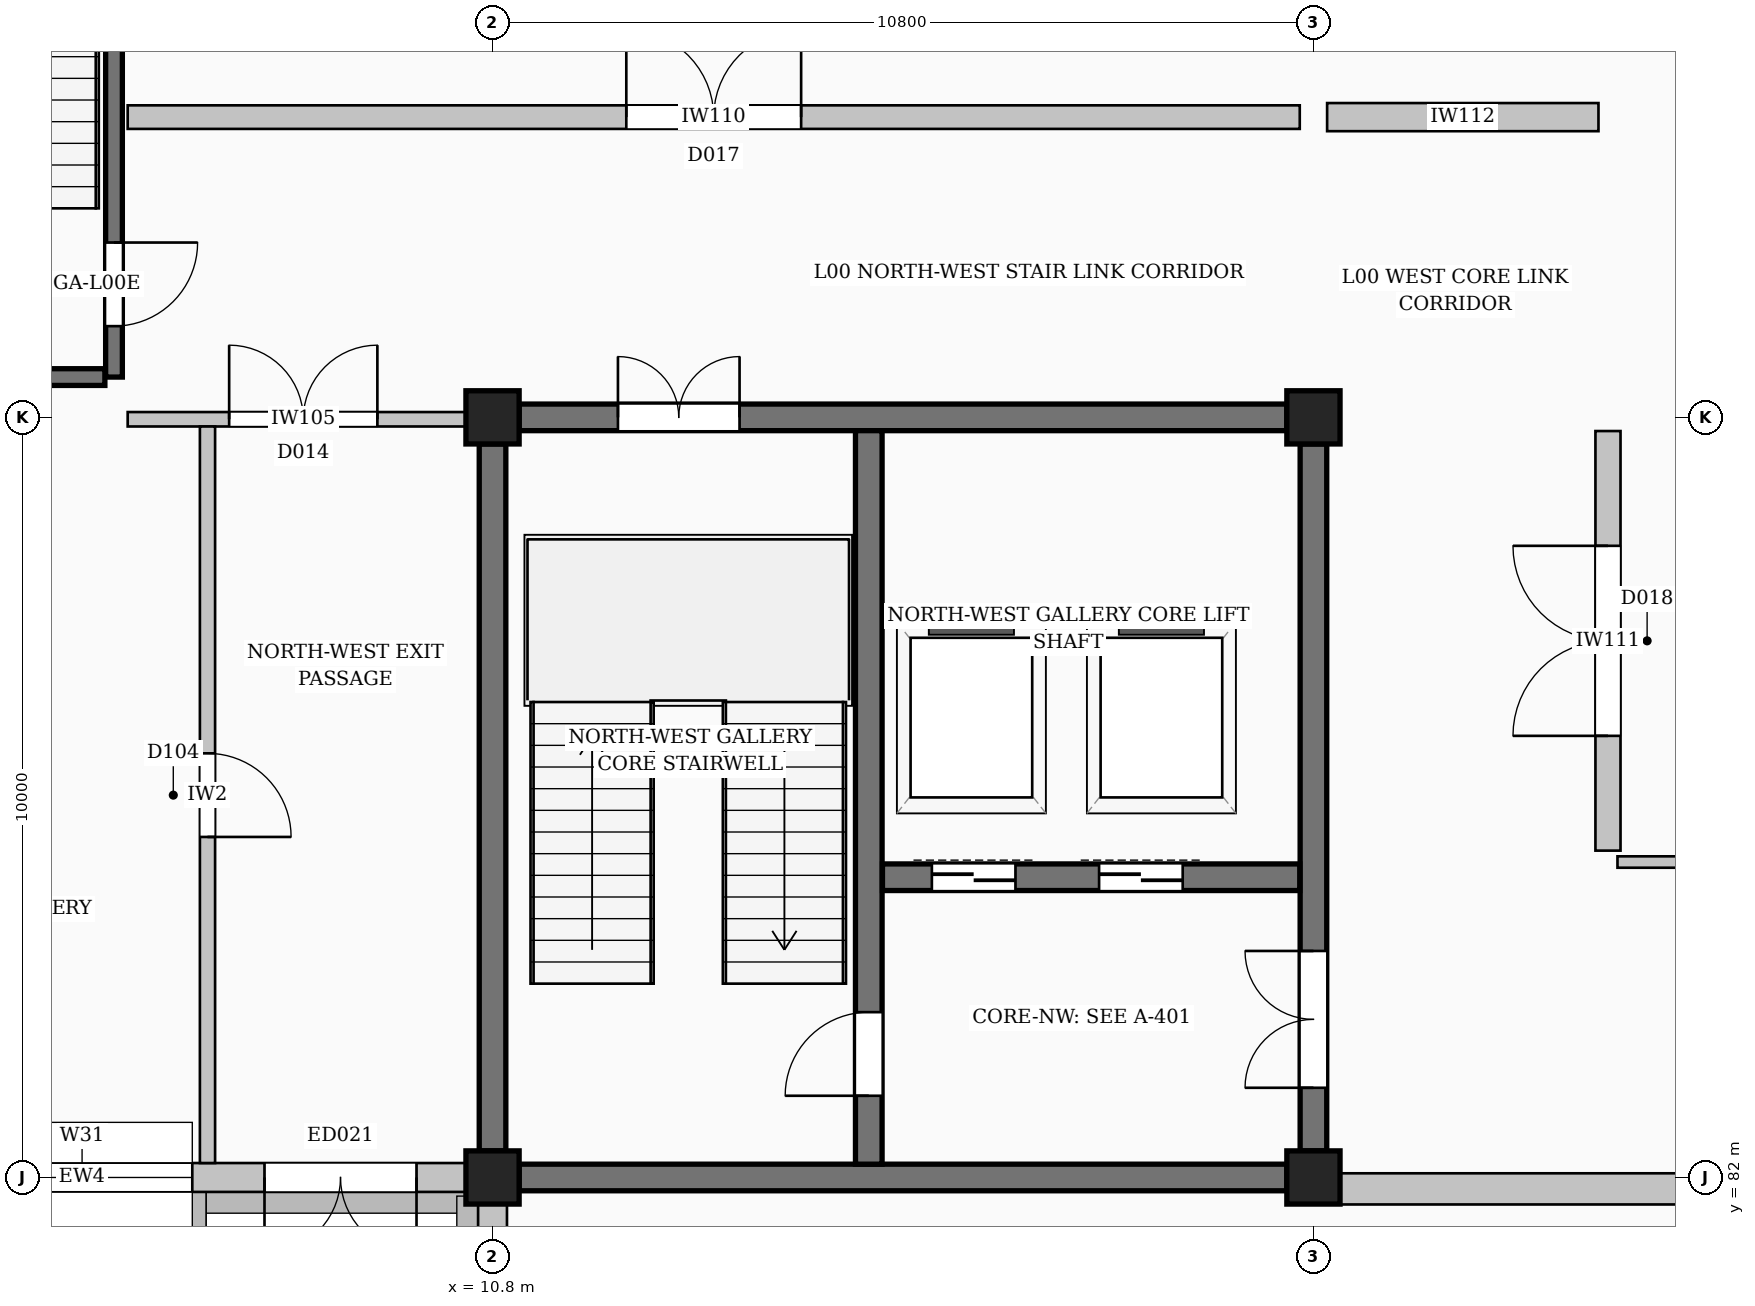
"""IFC4 building model, lengths in metres.
Left out: names, types, materials, properties, quantities, classifications, styles, units other than length and angle.
Written with IfcOpenShell. Run it as: python <this file> out.ifc"""

import sys

from ifc_helpers import new_model, si_unit, direction, frame, frame_2d, origin, origin_2d, place, context, subcontext, project, spatial, rectangle, extrude, element, fill, save


model = new_model("IFC4")
c1 = context("Model", 3, precision=1e-05, world=origin(), true_north=direction((0.0, 1.0)))
c2 = subcontext(c1, "Body", "Model", "MODEL_VIEW")
j1 = project(units=[si_unit("LENGTHUNIT", "METRE"), si_unit("PLANEANGLEUNIT", "RADIAN")], contexts=[c1])
p1 = place(None, origin())
s1 = spatial("IfcSite", under=j1, at=p1, CompositionType="ELEMENT")
p2 = place(p1, origin())
s2 = spatial("IfcBuilding", under=s1, at=p2, CompositionType="ELEMENT")
p3 = place(p2, origin())
s3 = spatial("IfcBuildingStorey", under=s2, at=p3, CompositionType="ELEMENT", Elevation=0.0)
for number, where, z_axis, x_axis in (
    (1, (10.8, 82.0, 0.0), (0.0, 0.0, 1.0), (1.0, 0.0, 0.0)),
    (2, (10.8, 92.0, 0.0), (0.0, 0.0, 1.0), (1.0, 0.0, 0.0)),
    (3, (21.6, 82.0, 0.0), (0.0, 0.0, 1.0), (1.0, 0.0, 0.0)),
    (4, (21.6, 92.0, 0.0), (0.0, 0.0, 1.0), (1.0, 0.0, 0.0)),
):
    element("IfcColumn", number, at=place(p3, frame(where, z_axis=z_axis, x_axis=x_axis)), inside=s3, PredefinedType="COLUMN", context=c2, shape_type="SweptSolid", body=[
        extrude(rectangle(XDim=0.7, YDim=0.7, at=origin_2d()), origin(), (0.0, 0.0, 1.0), 4.8),
    ])
p4 = place(p3, frame((0.145, 82.0, 0.0), z_axis=(0.0, 0.0, 1.0), x_axis=(1.0, 0.0, 0.0)))
e5 = element("IfcWall", 5, at=p4, inside=s3, PredefinedType="STANDARD", context=c2, shape_type="SweptSolid", body=[
    extrude(rectangle(XDim=10.51, YDim=0.38, at=frame_2d((5.255, 0.0))), origin(), (0.0, 0.0, 1.0), 4.009),
])
p5 = place(p4, frame((3.805, 0.0, 1.0)))
e6 = element("IfcOpeningElement", 6, at=p5, cuts=e5, PredefinedType="OPENING", context=c2, shape_type="SweptSolid", body=[
    extrude(rectangle(XDim=2.9, YDim=2.5, at=frame_2d((1.45, 1.25))), frame((0.0, 0.2, 0.0), z_axis=(0.0, -1.0, 0.0), x_axis=(1.0, 0.0, 0.0)), (0.0, 0.0, 1.0), 0.4),
])
p6 = place(p4, frame((7.655, 0.0, 0.0)))
e7 = element("IfcOpeningElement", 7, at=p6, cuts=e5, PredefinedType="OPENING", context=c2, shape_type="SweptSolid", body=[
    extrude(rectangle(XDim=2.0, YDim=2.3, at=frame_2d((1.0, 1.15))), frame((0.0, 0.2, 0.0), z_axis=(0.0, -1.0, 0.0), x_axis=(1.0, 0.0, 0.0)), (0.0, 0.0, 1.0), 0.4),
])
p7 = place(p3, frame((10.8, 81.855, 0.0), z_axis=(0.0, 0.0, 1.0), x_axis=(0.0, -1.0, 0.0)))
e8 = element("IfcWall", 8, at=p7, inside=s3, PredefinedType="STANDARD", context=c2, shape_type="SweptSolid", body=[
    extrude(rectangle(XDim=9.71, YDim=0.38, at=frame_2d((4.855, 0.0))), origin(), (0.0, 0.0, 1.0), 4.04),
])
p8 = place(p7, frame((3.655, 0.0, 0.0)))
e9 = element("IfcOpeningElement", 9, at=p8, cuts=e8, PredefinedType="OPENING", context=c2, shape_type="SweptSolid", body=[
    extrude(rectangle(XDim=2.4, YDim=2.6, at=frame_2d((1.2, 1.3))), frame((0.0, 0.2, 0.0), z_axis=(0.0, -1.0, 0.0), x_axis=(1.0, 0.0, 0.0)), (0.0, 0.0, 1.0), 0.4),
])
p9 = place(p3, frame((11.15, 82.0, 0.0), z_axis=(0.0, 0.0, 1.0), x_axis=(1.0, 0.0, 0.0)))
e10 = element("IfcWall", 10, at=p9, inside=s3, PredefinedType="SHEAR", context=c2, shape_type="SweptSolid", body=[
    extrude(rectangle(XDim=10.1, YDim=0.35, at=frame_2d((5.05, 0.0))), origin(), (0.0, 0.0, 1.0), 4.56),
])
p10 = place(p3, frame((11.15, 92.0, 0.0), z_axis=(0.0, 0.0, 1.0), x_axis=(1.0, 0.0, 0.0)))
e11 = element("IfcWall", 11, at=p10, inside=s3, PredefinedType="SHEAR", context=c2, shape_type="SweptSolid", body=[
    extrude(rectangle(XDim=10.1, YDim=0.35, at=frame_2d((5.05, 0.0))), origin(), (0.0, 0.0, 1.0), 4.56),
])
p11 = place(p10, frame((1.3, 0.0, 0.0)))
e12 = element("IfcOpeningElement", 12, at=p11, cuts=e11, PredefinedType="OPENING", context=c2, shape_type="SweptSolid", body=[
    extrude(rectangle(XDim=1.6, YDim=2.2, at=frame_2d((0.8, 1.1))), frame((0.0, 0.185, 0.0), z_axis=(0.0, -1.0, 0.0), x_axis=(1.0, 0.0, 0.0)), (0.0, 0.0, 1.0), 0.37),
])
p12 = place(p3, frame((10.8, 82.35, 0.0), z_axis=(0.0, 0.0, 1.0), x_axis=(0.0, 1.0, 0.0)))
e13 = element("IfcWall", 13, at=p12, inside=s3, PredefinedType="SHEAR", context=c2, shape_type="SweptSolid", body=[
    extrude(rectangle(XDim=9.3, YDim=0.35, at=frame_2d((4.65, 0.0))), origin(), (0.0, 0.0, 1.0), 4.56),
])
p13 = place(p3, frame((21.6, 82.35, 0.0), z_axis=(0.0, 0.0, 1.0), x_axis=(0.0, 1.0, 0.0)))
e14 = element("IfcWall", 14, at=p13, inside=s3, PredefinedType="SHEAR", context=c2, shape_type="SweptSolid", body=[
    extrude(rectangle(XDim=9.3, YDim=0.35, at=frame_2d((4.65, 0.0))), origin(), (0.0, 0.0, 1.0), 4.56),
])
p14 = place(p13, frame((0.83, 0.0, 0.0)))
e15 = element("IfcOpeningElement", 15, at=p14, cuts=e14, PredefinedType="OPENING", context=c2, shape_type="SweptSolid", body=[
    extrude(rectangle(XDim=1.8, YDim=2.25, at=frame_2d((0.9, 1.125))), frame((0.0, 0.185, 0.0), z_axis=(0.0, -1.0, 0.0), x_axis=(1.0, 0.0, 0.0)), (0.0, 0.0, 1.0), 0.37),
])
p15 = place(p3, frame((15.75, 82.175, 0.0), z_axis=(0.0, 0.0, 1.0), x_axis=(0.0, 1.0, 0.0)))
e16 = element("IfcWall", 16, at=p15, inside=s3, PredefinedType="SHEAR", context=c2, shape_type="SweptSolid", body=[
    extrude(rectangle(XDim=9.65, YDim=0.35, at=frame_2d((4.825, 0.0))), origin(), (0.0, 0.0, 1.0), 4.56),
])
p16 = place(p15, frame((0.9, 0.0, 0.0)))
e17 = element("IfcOpeningElement", 17, at=p16, cuts=e16, PredefinedType="OPENING", context=c2, shape_type="SweptSolid", body=[
    extrude(rectangle(XDim=1.1, YDim=2.2, at=frame_2d((0.55, 1.1))), frame((0.0, 0.185, 0.0), z_axis=(0.0, -1.0, 0.0), x_axis=(1.0, 0.0, 0.0)), (0.0, 0.0, 1.0), 0.37),
])
p17 = place(p3, frame((15.93, 85.95, 0.0), z_axis=(0.0, 0.0, 1.0), x_axis=(1.0, 0.0, 0.0)))
e18 = element("IfcWall", 18, at=p17, inside=s3, PredefinedType="SHEAR", context=c2, shape_type="SweptSolid", body=[
    extrude(rectangle(XDim=5.49, YDim=0.35, at=frame_2d((2.745, 0.0))), origin(), (0.0, 0.0, 1.0), 4.56),
])
p18 = place(p17, frame((0.65, 0.0, 0.0)))
e19 = element("IfcOpeningElement", 19, at=p18, cuts=e18, PredefinedType="OPENING", context=c2, shape_type="SweptSolid", body=[
    extrude(rectangle(XDim=1.1, YDim=2.2, at=frame_2d((0.55, 1.1))), frame((0.0, 0.185, 0.0), z_axis=(0.0, -1.0, 0.0), x_axis=(1.0, 0.0, 0.0)), (0.0, 0.0, 1.0), 0.37),
])
p19 = place(p17, frame((2.85, 0.0, 0.0)))
e20 = element("IfcOpeningElement", 20, at=p19, cuts=e18, PredefinedType="OPENING", context=c2, shape_type="SweptSolid", body=[
    extrude(rectangle(XDim=1.1, YDim=2.2, at=frame_2d((0.55, 1.1))), frame((0.0, 0.185, 0.0), z_axis=(0.0, -1.0, 0.0), x_axis=(1.0, 0.0, 0.0)), (0.0, 0.0, 1.0), 0.37),
])
p20 = place(p3, frame((5.82, 92.53, 0.0), z_axis=(0.0, 0.0, 1.0), x_axis=(0.0, 1.0, 0.0)))
e21 = element("IfcWall", 21, at=p20, inside=s3, PredefinedType="SHEAR", context=c2, shape_type="SweptSolid", body=[
    extrude(rectangle(XDim=9.14, YDim=0.22, at=frame_2d((4.57, 0.0))), origin(), (0.0, 0.0, 1.0), 4.56),
])
p21 = place(p20, frame((0.67, 0.0, 0.0)))
e22 = element("IfcOpeningElement", 22, at=p21, cuts=e21, PredefinedType="OPENING", context=c2, shape_type="SweptSolid", body=[
    extrude(rectangle(XDim=1.1, YDim=2.2, at=frame_2d((0.55, 1.1))), frame((0.0, 0.12, 0.0), z_axis=(0.0, -1.0, 0.0), x_axis=(1.0, 0.0, 0.0)), (0.0, 0.0, 1.0), 0.24),
])
p22 = place(p3, frame((1.3, 92.53, 0.0), z_axis=(0.0, 0.0, 1.0), x_axis=(1.0, 0.0, 0.0)))
e23 = element("IfcWall", 23, at=p22, inside=s3, PredefinedType="SHEAR", context=c2, shape_type="SweptSolid", body=[
    extrude(rectangle(XDim=4.4, YDim=0.22, at=frame_2d((2.2, 0.0))), origin(), (0.0, 0.0, 1.0), 4.56),
])
p23 = place(p22, frame((1.65, 0.0, 0.0)))
e24 = element("IfcOpeningElement", 24, at=p23, cuts=e23, PredefinedType="OPENING", context=c2, shape_type="SweptSolid", body=[
    extrude(rectangle(XDim=1.1, YDim=2.2, at=frame_2d((0.55, 1.1))), frame((0.0, 0.12, 0.0), z_axis=(0.0, -1.0, 0.0), x_axis=(1.0, 0.0, 0.0)), (0.0, 0.0, 1.0), 0.24),
])
p24 = place(p3, frame((21.78, 81.85, 0.0), z_axis=(0.0, 0.0, 1.0), x_axis=(1.0, 0.0, 0.0)))
e25 = element("IfcWall", 25, at=p24, inside=s3, PredefinedType="PARTITIONING", context=c2, shape_type="SweptSolid", body=[
    extrude(rectangle(XDim=10.42, YDim=0.41, at=frame_2d((5.21, 0.0))), origin(), (0.0, 0.0, 1.0), 3.989),
])
p25 = place(p3, frame((25.6, 86.15, 0.0), z_axis=(0.0, 0.0, 1.0), x_axis=(1.0, 0.0, 0.0)))
e26 = element("IfcWall", 26, at=p25, inside=s3, PredefinedType="PARTITIONING", context=c2, shape_type="SweptSolid", body=[
    extrude(rectangle(XDim=28.22, YDim=0.15, at=frame_2d((14.11, 0.0))), origin(), (0.0, 0.0, 1.0), 4.52),
])
p26 = place(p25, frame((13.235, 0.0, 0.0)))
e27 = element("IfcOpeningElement", 27, at=p26, cuts=e26, PredefinedType="OPENING", context=c2, shape_type="SweptSolid", body=[
    extrude(rectangle(XDim=1.75, YDim=2.45, at=frame_2d((0.875, 1.225))), frame((0.0, 0.085, 0.0), z_axis=(0.0, -1.0, 0.0), x_axis=(1.0, 0.0, 0.0)), (0.0, 0.0, 1.0), 0.17),
])
p27 = place(p3, frame((6.0, 91.975, 0.0), z_axis=(0.0, 0.0, 1.0), x_axis=(1.0, 0.0, 0.0)))
e28 = element("IfcWall", 28, at=p27, inside=s3, PredefinedType="PARTITIONING", context=c2, shape_type="SweptSolid", body=[
    extrude(rectangle(XDim=4.62, YDim=0.19, at=frame_2d((2.31, 0.0))), origin(), (0.0, 0.0, 1.0), 4.069),
])
p28 = place(p27, frame((1.335, 0.0, 0.0)))
e29 = element("IfcOpeningElement", 29, at=p28, cuts=e28, PredefinedType="OPENING", context=c2, shape_type="SweptSolid", body=[
    extrude(rectangle(XDim=1.95, YDim=2.5, at=frame_2d((0.975, 1.25))), frame((0.0, 0.105, 0.0), z_axis=(0.0, -1.0, 0.0), x_axis=(1.0, 0.0, 0.0)), (0.0, 0.0, 1.0), 0.21),
])
p29 = place(p3, frame((6.0, 95.95, 0.0), z_axis=(0.0, 0.0, 1.0), x_axis=(1.0, 0.0, 0.0)))
e30 = element("IfcWall", 30, at=p29, inside=s3, PredefinedType="PARTITIONING", context=c2, shape_type="SweptSolid", body=[
    extrude(rectangle(XDim=15.42, YDim=0.31, at=frame_2d((7.71, 0.0))), origin(), (0.0, 0.0, 1.0), 4.52),
])
p30 = place(p29, frame((6.56, 0.0, 0.0)))
e31 = element("IfcOpeningElement", 31, at=p30, cuts=e30, PredefinedType="OPENING", context=c2, shape_type="SweptSolid", body=[
    extrude(rectangle(XDim=2.3, YDim=2.65, at=frame_2d((1.15, 1.325))), frame((0.0, 0.165, 0.0), z_axis=(0.0, -1.0, 0.0), x_axis=(1.0, 0.0, 0.0)), (0.0, 0.0, 1.0), 0.33),
])
p31 = place(p3, frame((25.475, 86.3, 0.0), z_axis=(0.0, 0.0, 1.0), x_axis=(0.0, 1.0, 0.0)))
e32 = element("IfcWall", 32, at=p31, inside=s3, PredefinedType="PARTITIONING", context=c2, shape_type="SweptSolid", body=[
    extrude(rectangle(XDim=5.52, YDim=0.33, at=frame_2d((2.76, 0.0))), origin(), (0.0, 0.0, 1.0), 4.52),
])
p32 = place(p31, frame((1.51, 0.0, 0.0)))
e33 = element("IfcOpeningElement", 33, at=p32, cuts=e32, PredefinedType="OPENING", context=c2, shape_type="SweptSolid", body=[
    extrude(rectangle(XDim=2.5, YDim=2.75, at=frame_2d((1.25, 1.375))), frame((0.0, 0.175, 0.0), z_axis=(0.0, -1.0, 0.0), x_axis=(1.0, 0.0, 0.0)), (0.0, 0.0, 1.0), 0.35),
])
p33 = place(p3, frame((21.78, 95.95, 0.0), z_axis=(0.0, 0.0, 1.0), x_axis=(1.0, 0.0, 0.0)))
e34 = element("IfcWall", 34, at=p33, inside=s3, PredefinedType="PARTITIONING", context=c2, shape_type="SweptSolid", body=[
    extrude(rectangle(XDim=3.57, YDim=0.37, at=frame_2d((1.785, 0.0))), origin(), (0.0, 0.0, 1.0), 4.52),
])
p34 = place(p3, frame((7.05, 82.19, 0.0), z_axis=(0.0, 0.0, 1.0), x_axis=(0.0, 1.0, 0.0)))
e35 = element("IfcWall", 35, at=p34, inside=s3, PredefinedType="SOLIDWALL", context=c2, shape_type="SweptSolid", body=[
    extrude(rectangle(XDim=9.69, YDim=0.2, at=frame_2d((4.845, 0.0))), origin(), (0.0, 0.0, 1.0), 4.069),
])
p35 = place(p34, frame((4.29, 0.0, 0.0)))
e36 = element("IfcOpeningElement", 36, at=p35, cuts=e35, PredefinedType="OPENING", context=c2, shape_type="SweptSolid", body=[
    extrude(rectangle(XDim=1.1, YDim=2.2, at=frame_2d((0.55, 1.1))), frame((0.0, 0.11, 0.0), z_axis=(0.0, -1.0, 0.0), x_axis=(1.0, 0.0, 0.0)), (0.0, 0.0, 1.0), 0.22),
])
p36 = place(p5, origin())
e37 = element("IfcWindow", 37, at=p36, inside=s3, PartitioningType="SINGLE_PANEL", PredefinedType="WINDOW", context=c2, shape_type="SweptSolid", body=[
    extrude(rectangle(XDim=2.9, YDim=2.5, at=frame_2d((1.45, 1.25))), frame((0.0, 0.03, 0.0), z_axis=(0.0, -1.0, 0.0), x_axis=(1.0, 0.0, 0.0)), (0.0, 0.0, 1.0), 0.06),
])
fill(e6, e37)
p37 = place(p16, origin())
e38 = element("IfcDoor", 38, at=p37, inside=s3, OperationType="SINGLE_SWING_LEFT", PredefinedType="DOOR", context=c2, shape_type="SweptSolid", body=[
    extrude(rectangle(XDim=1.1, YDim=2.2, at=frame_2d((0.55, 1.1))), frame((0.0, 0.025, 0.0), z_axis=(0.0, -1.0, 0.0), x_axis=(1.0, 0.0, 0.0)), (0.0, 0.0, 1.0), 0.05),
])
fill(e17, e38)
p38 = place(p14, origin())
e39 = element("IfcDoor", 39, at=p38, inside=s3, OperationType="DOUBLE_DOOR_SINGLE_SWING", PredefinedType="DOOR", context=c2, shape_type="SweptSolid", body=[
    extrude(rectangle(XDim=1.8, YDim=2.25, at=frame_2d((0.9, 1.125))), frame((0.0, 0.025, 0.0), z_axis=(0.0, -1.0, 0.0), x_axis=(1.0, 0.0, 0.0)), (0.0, 0.0, 1.0), 0.05),
])
fill(e15, e39)
p39 = place(p11, origin())
e40 = element("IfcDoor", 40, at=p39, inside=s3, OperationType="DOUBLE_DOOR_SINGLE_SWING", PredefinedType="DOOR", context=c2, shape_type="SweptSolid", body=[
    extrude(rectangle(XDim=1.6, YDim=2.2, at=frame_2d((0.8, 1.1))), frame((0.0, 0.025, 0.0), z_axis=(0.0, -1.0, 0.0), x_axis=(1.0, 0.0, 0.0)), (0.0, 0.0, 1.0), 0.05),
])
fill(e12, e40)
p40 = place(p18, origin())
e41 = element("IfcDoor", 41, at=p40, inside=s3, OperationType="DOUBLE_DOOR_SLIDING", PredefinedType="DOOR", context=c2, shape_type="SweptSolid", body=[
    extrude(rectangle(XDim=1.1, YDim=2.2, at=frame_2d((0.55, 1.1))), frame((0.0, 0.025, 0.0), z_axis=(0.0, -1.0, 0.0), x_axis=(1.0, 0.0, 0.0)), (0.0, 0.0, 1.0), 0.05),
])
fill(e19, e41)
p41 = place(p19, origin())
e42 = element("IfcDoor", 42, at=p41, inside=s3, OperationType="DOUBLE_DOOR_SLIDING", PredefinedType="DOOR", context=c2, shape_type="SweptSolid", body=[
    extrude(rectangle(XDim=1.1, YDim=2.2, at=frame_2d((0.55, 1.1))), frame((0.0, 0.025, 0.0), z_axis=(0.0, -1.0, 0.0), x_axis=(1.0, 0.0, 0.0)), (0.0, 0.0, 1.0), 0.05),
])
fill(e20, e42)
p42 = place(p28, origin())
e43 = element("IfcDoor", 43, at=p42, inside=s3, OperationType="DOUBLE_DOOR_SINGLE_SWING", PredefinedType="DOOR", context=c2, shape_type="SweptSolid", body=[
    extrude(rectangle(XDim=1.95, YDim=2.5, at=frame_2d((0.975, 1.25))), frame((0.0, 0.025, 0.0), z_axis=(0.0, -1.0, 0.0), x_axis=(1.0, 0.0, 0.0)), (0.0, 0.0, 1.0), 0.05),
])
fill(e29, e43)
p43 = place(p30, origin())
e44 = element("IfcDoor", 44, at=p43, inside=s3, OperationType="DOUBLE_DOOR_SINGLE_SWING", PredefinedType="DOOR", context=c2, shape_type="SweptSolid", body=[
    extrude(rectangle(XDim=2.3, YDim=2.65, at=frame_2d((1.15, 1.325))), frame((0.0, 0.025, 0.0), z_axis=(0.0, -1.0, 0.0), x_axis=(1.0, 0.0, 0.0)), (0.0, 0.0, 1.0), 0.05),
])
fill(e31, e44)
p44 = place(p32, origin())
e45 = element("IfcDoor", 45, at=p44, inside=s3, OperationType="DOUBLE_DOOR_SINGLE_SWING", PredefinedType="DOOR", context=c2, shape_type="SweptSolid", body=[
    extrude(rectangle(XDim=2.5, YDim=2.75, at=frame_2d((1.25, 1.375))), frame((0.0, 0.025, 0.0), z_axis=(0.0, -1.0, 0.0), x_axis=(1.0, 0.0, 0.0)), (0.0, 0.0, 1.0), 0.05),
])
fill(e33, e45)
p45 = place(p35, frame((1.1, 0.0, 0.0), z_axis=(0.0, 0.0, 1.0), x_axis=(-1.0, 0.0, 0.0)))
e46 = element("IfcDoor", 46, at=p45, inside=s3, OperationType="SINGLE_SWING_LEFT", PredefinedType="DOOR", context=c2, shape_type="SweptSolid", body=[
    extrude(rectangle(XDim=1.1, YDim=2.2, at=frame_2d((0.55, 1.1))), frame((0.0, 0.025, 0.0), z_axis=(0.0, -1.0, 0.0), x_axis=(1.0, 0.0, 0.0)), (0.0, 0.0, 1.0), 0.05),
])
fill(e36, e46)
p46 = place(p6, frame((2.0, 0.0, 0.0), z_axis=(0.0, 0.0, 1.0), x_axis=(-1.0, 0.0, 0.0)))
e47 = element("IfcDoor", 47, at=p46, inside=s3, OperationType="DOUBLE_DOOR_SINGLE_SWING", PredefinedType="DOOR", context=c2, shape_type="SweptSolid", body=[
    extrude(rectangle(XDim=2.0, YDim=2.3, at=frame_2d((1.0, 1.15))), frame((0.0, 0.025, 0.0), z_axis=(0.0, -1.0, 0.0), x_axis=(1.0, 0.0, 0.0)), (0.0, 0.0, 1.0), 0.05),
])
fill(e7, e47)
p47 = place(p21, frame((1.1, 0.0, 0.0), z_axis=(0.0, 0.0, 1.0), x_axis=(-1.0, 0.0, 0.0)))
e48 = element("IfcDoor", 48, at=p47, inside=s3, OperationType="SINGLE_SWING_RIGHT", PredefinedType="DOOR", context=c2, shape_type="SweptSolid", body=[
    extrude(rectangle(XDim=1.1, YDim=2.2, at=frame_2d((0.55, 1.1))), frame((0.0, 0.025, 0.0), z_axis=(0.0, -1.0, 0.0), x_axis=(1.0, 0.0, 0.0)), (0.0, 0.0, 1.0), 0.05),
])
fill(e22, e48)
save(model, sys.argv[1])
